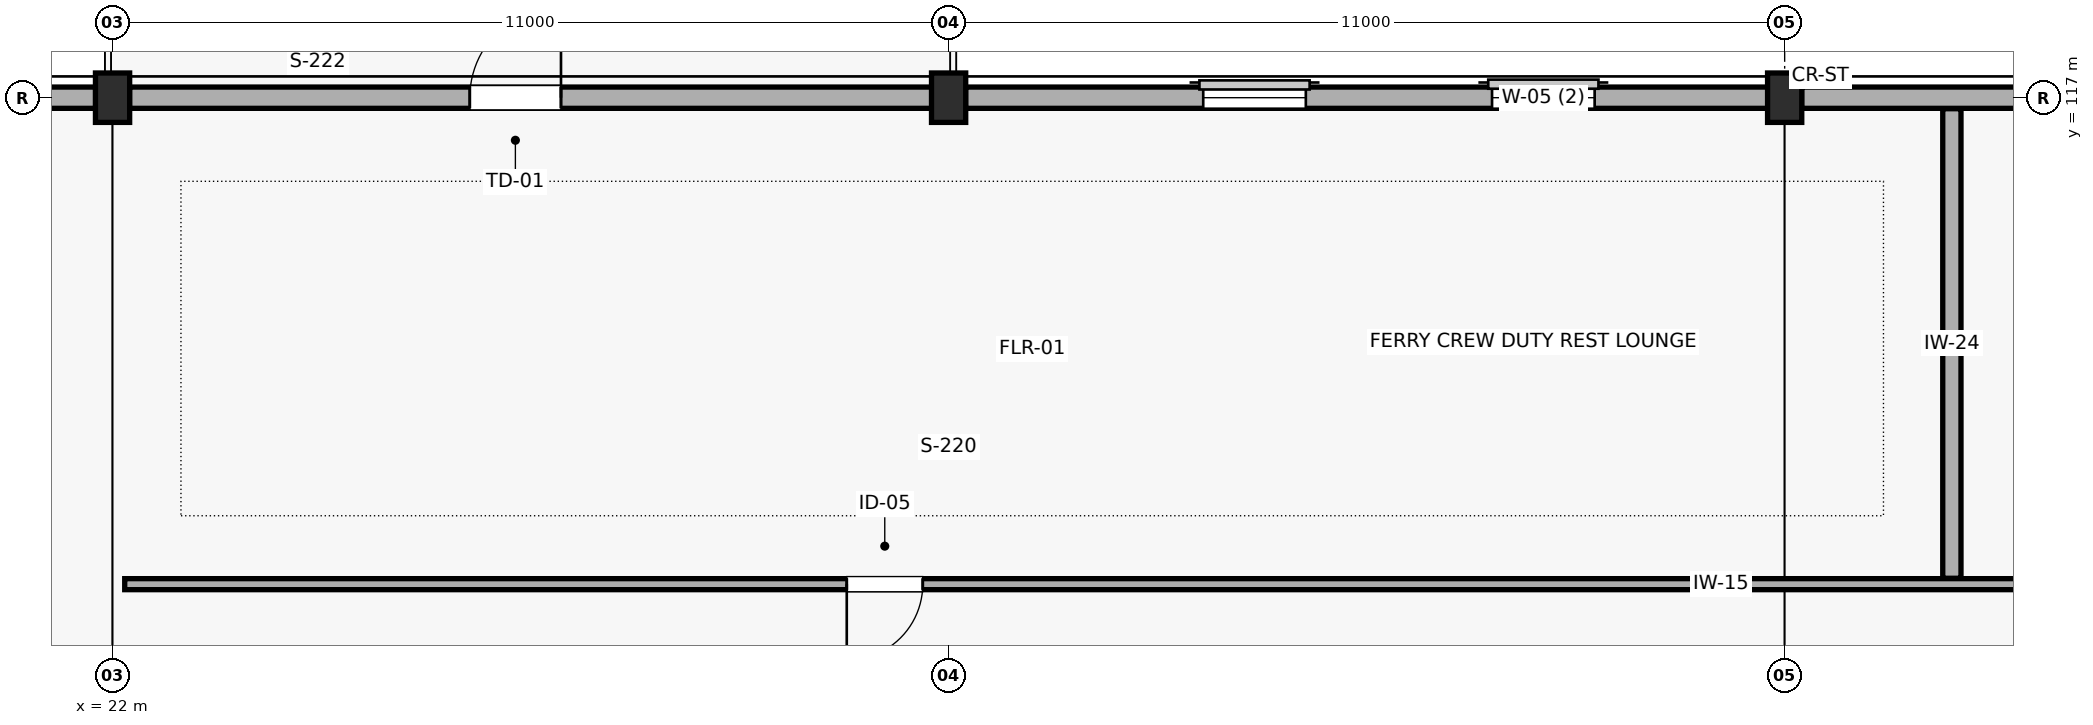
"""IFC4 building model, lengths in metres.
Left out: names, types, materials, properties, quantities, classifications, styles, units other than length and angle.
Written with IfcOpenShell. Run it as: python <this file> out.ifc"""

import sys

from ifc_helpers import new_model, si_unit, direction, frame, frame_2d, origin, origin_2d, place, context, subcontext, project, spatial, rectangle, extrude, element, fill, save


model = new_model("IFC4")
c1 = context("Model", 3, precision=1e-05, world=origin(), true_north=direction((0.0, 1.0)))
c2 = subcontext(c1, "Body", "Model", "MODEL_VIEW")
j1 = project(units=[si_unit("LENGTHUNIT", "METRE"), si_unit("PLANEANGLEUNIT", "RADIAN")], contexts=[c1])
p1 = place(None, origin())
s1 = spatial("IfcSite", under=j1, at=p1, CompositionType="ELEMENT")
p2 = place(p1, origin())
s2 = spatial("IfcBuilding", under=s1, at=p2, CompositionType="ELEMENT")
p3 = place(p2, frame((0.0, 0.0, 14.1)))
s3 = spatial("IfcBuildingStorey", under=s2, at=p3, CompositionType="ELEMENT", Elevation=14.1)
for number, where, z_axis, x_axis in (
    (1, (22.0, 117.0, 0.0), (0.0, 0.0, 1.0), (1.0, 0.0, 0.0)),
    (2, (33.0, 117.0, 0.0), (0.0, 0.0, 1.0), (1.0, 0.0, 0.0)),
    (3, (44.0, 117.0, 0.0), (0.0, 0.0, 1.0), (1.0, 0.0, 0.0)),
):
    element("IfcColumn", number, at=place(p3, frame(where, z_axis=z_axis, x_axis=x_axis)), inside=s3, PredefinedType="COLUMN", context=c2, shape_type="SweptSolid", body=[
        extrude(rectangle(XDim=0.45, YDim=0.65, at=origin_2d()), origin(), (0.0, 0.0, 1.0), 4.2),
    ])
p4 = place(p3, frame((21.777, 117.0, 0.0), z_axis=(0.0, 0.0, 1.0), x_axis=(-1.0, 0.0, 0.0)))
e4 = element("IfcWall", 4, at=p4, inside=s3, PredefinedType="SOLIDWALL", context=c2, shape_type="SweptSolid", body=[
    extrude(rectangle(XDim=10.554, YDim=0.28, at=frame_2d((5.277, 0.0))), origin(), (0.0, 0.0, 1.0), 3.437),
])
p5 = place(p4, frame((2.277, 0.0, 0.95)))
e5 = element("IfcOpeningElement", 5, at=p5, cuts=e4, PredefinedType="OPENING", context=c2, shape_type="SweptSolid", body=[
    extrude(rectangle(XDim=1.35, YDim=2.1, at=frame_2d((0.675, 1.05))), frame((0.0, 0.15, 0.0), z_axis=(0.0, -1.0, 0.0), x_axis=(1.0, 0.0, 0.0)), (0.0, 0.0, 1.0), 0.3),
])
p6 = place(p4, frame((6.077, 0.0, 0.95)))
e6 = element("IfcOpeningElement", 6, at=p6, cuts=e4, PredefinedType="OPENING", context=c2, shape_type="SweptSolid", body=[
    extrude(rectangle(XDim=1.35, YDim=2.1, at=frame_2d((0.675, 1.05))), frame((0.0, 0.15, 0.0), z_axis=(0.0, -1.0, 0.0), x_axis=(1.0, 0.0, 0.0)), (0.0, 0.0, 1.0), 0.3),
])
p7 = place(p3, frame((32.777, 117.0, 0.0), z_axis=(0.0, 0.0, 1.0), x_axis=(-1.0, 0.0, 0.0)))
e7 = element("IfcWall", 7, at=p7, inside=s3, PredefinedType="SOLIDWALL", context=c2, shape_type="SweptSolid", body=[
    extrude(rectangle(XDim=10.554, YDim=0.28, at=frame_2d((5.277, 0.0))), origin(), (0.0, 0.0, 1.0), 3.446),
])
p8 = place(p7, frame((4.877, 0.0, 0.0)))
e8 = element("IfcOpeningElement", 8, at=p8, cuts=e7, PredefinedType="OPENING", context=c2, shape_type="SweptSolid", body=[
    extrude(rectangle(XDim=1.2, YDim=2.2, at=frame_2d((0.6, 1.1))), frame((0.0, 0.15, 0.0), z_axis=(0.0, -1.0, 0.0), x_axis=(1.0, 0.0, 0.0)), (0.0, 0.0, 1.0), 0.3),
])
p9 = place(p3, frame((43.777, 117.0, 0.0), z_axis=(0.0, 0.0, 1.0), x_axis=(-1.0, 0.0, 0.0)))
e9 = element("IfcWall", 9, at=p9, inside=s3, PredefinedType="SOLIDWALL", context=c2, shape_type="SweptSolid", body=[
    extrude(rectangle(XDim=10.554, YDim=0.28, at=frame_2d((5.277, 0.0))), origin(), (0.0, 0.0, 1.0), 3.446),
])
p10 = place(p9, frame((2.277, 0.0, 0.95)))
e10 = element("IfcOpeningElement", 10, at=p10, cuts=e9, PredefinedType="OPENING", context=c2, shape_type="SweptSolid", body=[
    extrude(rectangle(XDim=1.35, YDim=2.1, at=frame_2d((0.675, 1.05))), frame((0.0, 0.15, 0.0), z_axis=(0.0, -1.0, 0.0), x_axis=(1.0, 0.0, 0.0)), (0.0, 0.0, 1.0), 0.3),
])
p11 = place(p9, frame((6.077, 0.0, 0.95)))
e11 = element("IfcOpeningElement", 11, at=p11, cuts=e9, PredefinedType="OPENING", context=c2, shape_type="SweptSolid", body=[
    extrude(rectangle(XDim=1.35, YDim=2.1, at=frame_2d((0.675, 1.05))), frame((0.0, 0.15, 0.0), z_axis=(0.0, -1.0, 0.0), x_axis=(1.0, 0.0, 0.0)), (0.0, 0.0, 1.0), 0.3),
])
p12 = place(p3, frame((54.777, 117.0, 0.0), z_axis=(0.0, 0.0, 1.0), x_axis=(-1.0, 0.0, 0.0)))
e12 = element("IfcWall", 12, at=p12, inside=s3, PredefinedType="SOLIDWALL", context=c2, shape_type="SweptSolid", body=[
    extrude(rectangle(XDim=10.554, YDim=0.28, at=frame_2d((5.277, 0.0))), origin(), (0.0, 0.0, 1.0), 3.446),
])
p13 = place(p12, frame((2.277, 0.0, 0.95)))
e13 = element("IfcOpeningElement", 13, at=p13, cuts=e12, PredefinedType="OPENING", context=c2, shape_type="SweptSolid", body=[
    extrude(rectangle(XDim=1.35, YDim=2.1, at=frame_2d((0.675, 1.05))), frame((0.0, 0.15, 0.0), z_axis=(0.0, -1.0, 0.0), x_axis=(1.0, 0.0, 0.0)), (0.0, 0.0, 1.0), 0.3),
])
p14 = place(p12, frame((6.077, 0.0, 0.95)))
e14 = element("IfcOpeningElement", 14, at=p14, cuts=e12, PredefinedType="OPENING", context=c2, shape_type="SweptSolid", body=[
    extrude(rectangle(XDim=1.35, YDim=2.1, at=frame_2d((0.675, 1.05))), frame((0.0, 0.15, 0.0), z_axis=(0.0, -1.0, 0.0), x_axis=(1.0, 0.0, 0.0)), (0.0, 0.0, 1.0), 0.3),
])
p15 = place(p3, frame((22.16, 110.6, 0.0), z_axis=(0.0, 0.0, 1.0), x_axis=(1.0, 0.0, 0.0)))
e15 = element("IfcWall", 15, at=p15, inside=s3, PredefinedType="PARTITIONING", context=c2, shape_type="SweptSolid", body=[
    extrude(rectangle(XDim=43.695, YDim=0.145, at=frame_2d((21.848, 0.0))), origin(), (0.0, 0.0, 1.0), 3.449),
])
p16 = place(p15, frame((9.5, 0.0, 0.0)))
e16 = element("IfcOpeningElement", 16, at=p16, cuts=e15, PredefinedType="OPENING", context=c2, shape_type="SweptSolid", body=[
    extrude(rectangle(XDim=1.0, YDim=2.15, at=frame_2d((0.5, 1.075))), frame((0.0, 0.083, 0.0), z_axis=(0.0, -1.0, 0.0), x_axis=(1.0, 0.0, 0.0)), (0.0, 0.0, 1.0), 0.165),
])
p17 = place(p15, frame((31.5, 0.0, 0.0)))
e17 = element("IfcOpeningElement", 17, at=p17, cuts=e15, PredefinedType="OPENING", context=c2, shape_type="SweptSolid", body=[
    extrude(rectangle(XDim=1.05, YDim=2.2, at=frame_2d((0.525, 1.1))), frame((0.0, 0.083, 0.0), z_axis=(0.0, -1.0, 0.0), x_axis=(1.0, 0.0, 0.0)), (0.0, 0.0, 1.0), 0.165),
])
p18 = place(p3, frame((46.2, 110.677, 0.0), z_axis=(0.0, 0.0, 1.0), x_axis=(0.0, 1.0, 0.0)))
e18 = element("IfcWall", 18, at=p18, inside=s3, PredefinedType="PARTITIONING", context=c2, shape_type="SweptSolid", body=[
    extrude(rectangle(XDim=6.177, YDim=0.24, at=frame_2d((3.089, 0.0))), origin(), (0.0, 0.0, 1.0), 3.678),
])
p19 = place(p8, frame((1.2, 0.0, 0.0), z_axis=(0.0, 0.0, 1.0), x_axis=(-1.0, 0.0, 0.0)))
e19 = element("IfcDoor", 19, at=p19, inside=s3, OperationType="SINGLE_SWING_RIGHT", PredefinedType="DOOR", context=c2, shape_type="SweptSolid", body=[
    extrude(rectangle(XDim=1.2, YDim=2.2, at=frame_2d((0.6, 1.1))), frame((0.0, 0.025, 0.0), z_axis=(0.0, -1.0, 0.0), x_axis=(1.0, 0.0, 0.0)), (0.0, 0.0, 1.0), 0.05),
])
fill(e8, e19)
p20 = place(p10, origin())
e20 = element("IfcWindow", 20, at=p20, inside=s3, PartitioningType="SINGLE_PANEL", PredefinedType="WINDOW", context=c2, shape_type="SweptSolid", body=[
    extrude(rectangle(XDim=1.35, YDim=2.1, at=frame_2d((0.675, 1.05))), frame((0.0, 0.03, 0.0), z_axis=(0.0, -1.0, 0.0), x_axis=(1.0, 0.0, 0.0)), (0.0, 0.0, 1.0), 0.06),
])
fill(e10, e20)
p21 = place(p11, origin())
e21 = element("IfcWindow", 21, at=p21, inside=s3, PartitioningType="SINGLE_PANEL", PredefinedType="WINDOW", context=c2, shape_type="SweptSolid", body=[
    extrude(rectangle(XDim=1.35, YDim=2.1, at=frame_2d((0.675, 1.05))), frame((0.0, 0.03, 0.0), z_axis=(0.0, -1.0, 0.0), x_axis=(1.0, 0.0, 0.0)), (0.0, 0.0, 1.0), 0.06),
])
fill(e11, e21)
p22 = place(p16, frame((1.0, 0.0, 0.0), z_axis=(0.0, 0.0, 1.0), x_axis=(-1.0, 0.0, 0.0)))
e22 = element("IfcDoor", 22, at=p22, inside=s3, OperationType="SINGLE_SWING_RIGHT", PredefinedType="DOOR", context=c2, shape_type="SweptSolid", body=[
    extrude(rectangle(XDim=1.0, YDim=2.15, at=frame_2d((0.5, 1.075))), frame((0.0, 0.025, 0.0), z_axis=(0.0, -1.0, 0.0), x_axis=(1.0, 0.0, 0.0)), (0.0, 0.0, 1.0), 0.05),
])
fill(e16, e22)
save(model, sys.argv[1])
